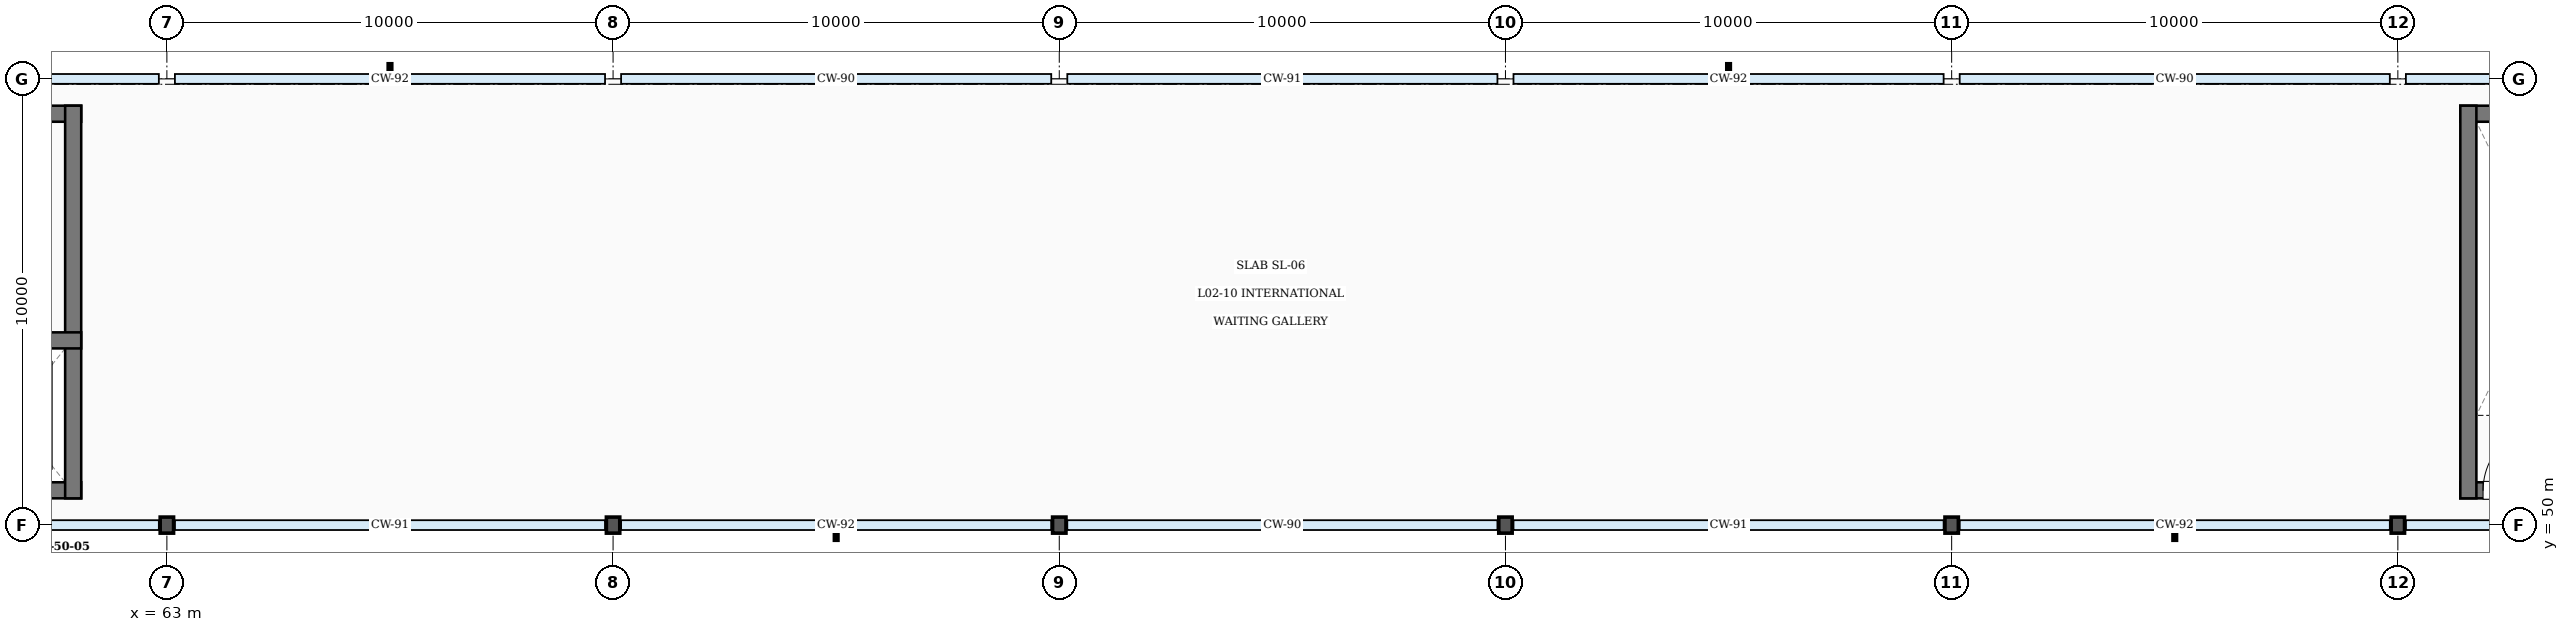
"""IFC4 building model, lengths in metres.
Left out: names, types, materials, properties, quantities, classifications, styles, units other than length and angle.
Written with IfcOpenShell. Run it as: python <this file> out.ifc"""

import sys

from ifc_helpers import new_model, si_unit, direction, frame, frame_2d, origin, origin_2d, place, context, subcontext, project, spatial, rectangle, i_section, extrude, element, fill, save


model = new_model("IFC4")
c1 = context("Model", 3, precision=1e-05, world=origin(), true_north=direction((0.0, 1.0)))
c2 = subcontext(c1, "Body", "Model", "MODEL_VIEW")
j1 = project(units=[si_unit("LENGTHUNIT", "METRE"), si_unit("PLANEANGLEUNIT", "RADIAN")], contexts=[c1])
p1 = place(None, origin())
s1 = spatial("IfcSite", under=j1, at=p1, CompositionType="ELEMENT")
p2 = place(p1, origin())
s2 = spatial("IfcBuilding", under=s1, at=p2, CompositionType="ELEMENT")
p3 = place(p2, frame((0.0, 0.0, 10.2)))
s3 = spatial("IfcBuildingStorey", under=s2, at=p3, CompositionType="ELEMENT", Elevation=10.2)
for number, where, z_axis, x_axis in (
    (1, (63.0, 50.0, 0.0), (0.0, 0.0, 1.0), (1.0, 0.0, 0.0)),
    (2, (73.0, 50.0, 0.0), (0.0, 0.0, 1.0), (1.0, 0.0, 0.0)),
    (3, (83.0, 50.0, 0.0), (0.0, 0.0, 1.0), (1.0, 0.0, 0.0)),
    (4, (93.0, 50.0, 0.0), (0.0, 0.0, 1.0), (1.0, 0.0, 0.0)),
    (5, (103.0, 50.0, 0.0), (0.0, 0.0, 1.0), (1.0, 0.0, 0.0)),
    (6, (113.0, 50.0, 0.0), (0.0, 0.0, 1.0), (1.0, 0.0, 0.0)),
):
    element("IfcColumn", number, at=place(p3, frame(where, z_axis=z_axis, x_axis=x_axis)), inside=s3, PredefinedType="COLUMN", context=c2, shape_type="SweptSolid", body=[
        extrude(i_section(OverallWidth=0.3, OverallDepth=0.36, WebThickness=0.012, FlangeThickness=0.022, FilletRadius=0.027, at=origin_2d()), origin(), (0.0, 0.0, 1.0), 4.2),
    ])
p4 = place(p3, frame((54.4, 50.78, 0.0), z_axis=(0.0, 0.0, 1.0), x_axis=(1.0, 0.0, 0.0)))
e7 = element("IfcWall", 7, at=p4, inside=s3, PredefinedType="SHEAR", context=c2, shape_type="SweptSolid", body=[
    extrude(rectangle(XDim=6.68, YDim=0.36, at=frame_2d((3.34, 0.0))), origin(), (0.0, 0.0, 1.0), 4.2),
])
p5 = place(p4, frame((0.51, 0.0, 0.0)))
e8 = element("IfcOpeningElement", 8, at=p5, cuts=e7, PredefinedType="OPENING", context=c2, shape_type="SweptSolid", body=[
    extrude(rectangle(XDim=1.45, YDim=2.4, at=frame_2d((0.725, 1.2))), frame((0.0, 0.19, 0.0), z_axis=(0.0, -1.0, 0.0), x_axis=(1.0, 0.0, 0.0)), (0.0, 0.0, 1.0), 0.38),
])
p6 = place(p4, frame((4.52, 0.0, 0.0)))
e9 = element("IfcOpeningElement", 9, at=p6, cuts=e7, PredefinedType="OPENING", context=c2, shape_type="SweptSolid", body=[
    extrude(rectangle(XDim=1.2, YDim=2.35, at=frame_2d((0.6, 1.175))), frame((0.0, 0.19, 0.0), z_axis=(0.0, -1.0, 0.0), x_axis=(1.0, 0.0, 0.0)), (0.0, 0.0, 1.0), 0.38),
])
p7 = place(p3, frame((54.4, 59.22, 0.0), z_axis=(0.0, 0.0, 1.0), x_axis=(1.0, 0.0, 0.0)))
e10 = element("IfcWall", 10, at=p7, inside=s3, PredefinedType="SHEAR", context=c2, shape_type="SweptSolid", body=[
    extrude(rectangle(XDim=6.68, YDim=0.36, at=frame_2d((3.34, 0.0))), origin(), (0.0, 0.0, 1.0), 4.2),
])
p8 = place(p3, frame((60.9, 50.6, 0.0), z_axis=(0.0, 0.0, 1.0), x_axis=(0.0, 1.0, 0.0)))
e11 = element("IfcWall", 11, at=p8, inside=s3, PredefinedType="SHEAR", context=c2, shape_type="SweptSolid", body=[
    extrude(rectangle(XDim=8.8, YDim=0.36, at=frame_2d((4.4, 0.0))), origin(), (0.0, 0.0, 1.0), 4.2),
])
p9 = place(p3, frame((58.14, 54.14, 0.0), z_axis=(0.0, 0.0, 1.0), x_axis=(1.0, 0.0, 0.0)))
e12 = element("IfcWall", 12, at=p9, inside=s3, PredefinedType="SHEAR", context=c2, shape_type="SweptSolid", body=[
    extrude(rectangle(XDim=2.94, YDim=0.36, at=frame_2d((1.47, 0.0))), origin(), (0.0, 0.0, 1.0), 4.2),
])
p10 = place(p3, frame((114.4, 50.78, 0.0), z_axis=(0.0, 0.0, 1.0), x_axis=(1.0, 0.0, 0.0)))
e13 = element("IfcWall", 13, at=p10, inside=s3, PredefinedType="SHEAR", context=c2, shape_type="SweptSolid", body=[
    extrude(rectangle(XDim=6.68, YDim=0.36, at=frame_2d((3.34, 0.0))), origin(), (0.0, 0.0, 1.0), 4.2),
])
p11 = place(p10, frame((0.51, 0.0, 0.0)))
e14 = element("IfcOpeningElement", 14, at=p11, cuts=e13, PredefinedType="OPENING", context=c2, shape_type="SweptSolid", body=[
    extrude(rectangle(XDim=1.45, YDim=2.4, at=frame_2d((0.725, 1.2))), frame((0.0, 0.19, 0.0), z_axis=(0.0, -1.0, 0.0), x_axis=(1.0, 0.0, 0.0)), (0.0, 0.0, 1.0), 0.38),
])
p12 = place(p10, frame((4.52, 0.0, 0.0)))
e15 = element("IfcOpeningElement", 15, at=p12, cuts=e13, PredefinedType="OPENING", context=c2, shape_type="SweptSolid", body=[
    extrude(rectangle(XDim=1.2, YDim=2.35, at=frame_2d((0.6, 1.175))), frame((0.0, 0.19, 0.0), z_axis=(0.0, -1.0, 0.0), x_axis=(1.0, 0.0, 0.0)), (0.0, 0.0, 1.0), 0.38),
])
p13 = place(p3, frame((114.4, 59.22, 0.0), z_axis=(0.0, 0.0, 1.0), x_axis=(1.0, 0.0, 0.0)))
e16 = element("IfcWall", 16, at=p13, inside=s3, PredefinedType="SHEAR", context=c2, shape_type="SweptSolid", body=[
    extrude(rectangle(XDim=6.68, YDim=0.36, at=frame_2d((3.34, 0.0))), origin(), (0.0, 0.0, 1.0), 4.2),
])
p14 = place(p3, frame((114.58, 50.6, 0.0), z_axis=(0.0, 0.0, 1.0), x_axis=(0.0, 1.0, 0.0)))
e17 = element("IfcWall", 17, at=p14, inside=s3, PredefinedType="SHEAR", context=c2, shape_type="SweptSolid", body=[
    extrude(rectangle(XDim=8.8, YDim=0.36, at=frame_2d((4.4, 0.0))), origin(), (0.0, 0.0, 1.0), 4.2),
])
p15 = place(p11, origin())
e18 = element("IfcDoor", 18, at=p15, inside=s3, OperationType="SINGLE_SWING_RIGHT", PredefinedType="DOOR", context=c2, shape_type="SweptSolid", body=[
    extrude(rectangle(XDim=1.45, YDim=2.4, at=frame_2d((0.725, 1.2))), frame((0.0, 0.025, 0.0), z_axis=(0.0, -1.0, 0.0), x_axis=(1.0, 0.0, 0.0)), (0.0, 0.0, 1.0), 0.05),
])
fill(e14, e18)
save(model, sys.argv[1])
